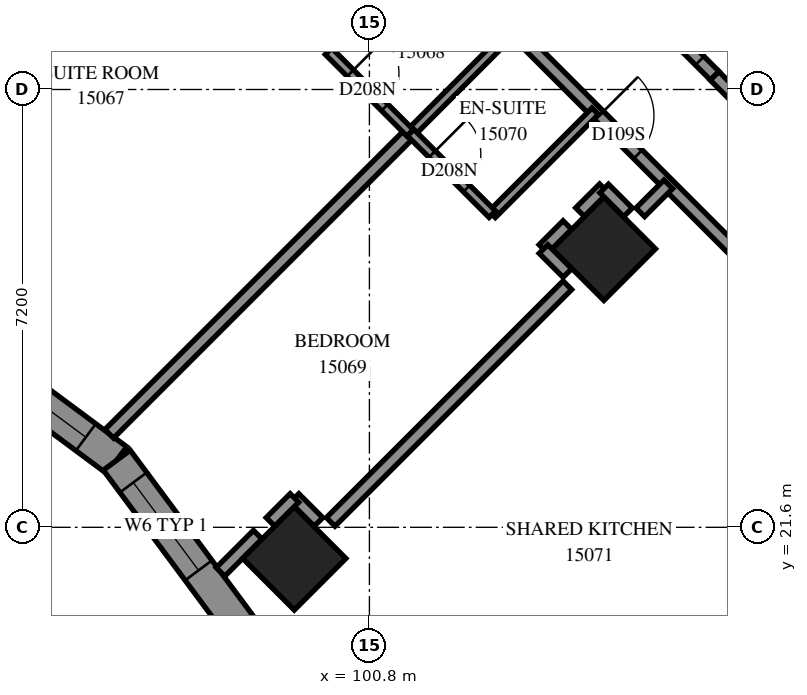
"""IFC4 building model, lengths in metres.
Left out: names, types, materials, properties, quantities, classifications, styles, units other than length and angle.
Written with IfcOpenShell. Run it as: python <this file> out.ifc"""

import sys

from ifc_helpers import new_model, si_unit, direction, frame, frame_2d, origin, origin_2d, place, context, subcontext, project, spatial, polyline, rectangle, outline, extrude, element, fill, save


model = new_model("IFC4")
c1 = context("Model", 3, precision=1e-05, world=origin(), true_north=direction((0.0, 1.0)))
c2 = subcontext(c1, "Body", "Model", "MODEL_VIEW")
j1 = project(units=[si_unit("LENGTHUNIT", "METRE"), si_unit("PLANEANGLEUNIT", "RADIAN")], contexts=[c1])
p1 = place(None, origin())
s1 = spatial("IfcSite", under=j1, at=p1, CompositionType="ELEMENT")
p2 = place(p1, origin())
s2 = spatial("IfcBuilding", under=s1, at=p2, CompositionType="ELEMENT")
p3 = place(p2, frame((0.0, 0.0, 57.6)))
s3 = spatial("IfcBuildingStorey", under=s2, at=p3, CompositionType="ELEMENT", Elevation=57.6)
for number, where, z_axis, x_axis in (
    (1, (104.656, 26.18, 0.0), (0.0, 0.0, 1.0), (0.707, -0.707, 0.0)),
    (2, (99.565, 21.088, 0.0), (0.0, 0.0, 1.0), (0.707, -0.707, 0.0)),
):
    element("IfcColumn", number, at=place(p3, frame(where, z_axis=z_axis, x_axis=x_axis)), inside=s3, PredefinedType="COLUMN", context=c2, shape_type="SweptSolid", body=[
        extrude(rectangle(XDim=1.2, YDim=1.2, at=origin_2d()), origin(), (0.0, 0.0, 1.0), 3.1),
    ])
p4 = place(p3, frame((93.505, 25.035, 0.0), z_axis=(0.0, 0.0, 1.0), x_axis=(0.8029298561, -0.5960735241, 0.0)))
e3 = element("IfcWall", 3, at=p4, inside=s3, PredefinedType="SOLIDWALL", context=c2, shape_type="SweptSolid", body=[
    extrude(outline(polyline([(-0.041, -0.275), (3.87, -0.275), (3.951, 0.275), (0.041, 0.275), (-0.041, -0.275)])), origin(), (0.0, 0.0, 1.0), 3.1),
])
p5 = place(p4, frame((0.477, 0.0, 0.5)))
e4 = element("IfcOpeningElement", 4, at=p5, cuts=e3, PredefinedType="OPENING", context=c2, shape_type="SweptSolid", body=[
    extrude(rectangle(XDim=2.8, YDim=2.45, at=frame_2d((1.4, 1.225))), frame((0.0, 0.285, 0.0), z_axis=(0.0, -1.0, 0.0), x_axis=(1.0, 0.0, 0.0)), (0.0, 0.0, 1.0), 0.57),
])
p6 = place(p3, frame((96.645, 22.704, 0.0), z_axis=(0.0, 0.0, 1.0), x_axis=(0.5960735241, -0.8029298561, 0.0)))
e5 = element("IfcWall", 5, at=p6, inside=s3, PredefinedType="SOLIDWALL", context=c2, shape_type="SweptSolid", body=[
    extrude(outline(polyline([(0.041, -0.275), (3.951, -0.275), (3.87, 0.275), (-0.041, 0.275), (0.041, -0.275)])), origin(), (0.0, 0.0, 1.0), 3.1),
])
p7 = place(p6, frame((0.456, 0.0, 0.7)))
e6 = element("IfcOpeningElement", 6, at=p7, cuts=e5, PredefinedType="OPENING", context=c2, shape_type="SweptSolid", body=[
    extrude(rectangle(XDim=1.8, YDim=2.2, at=frame_2d((0.9, 1.1))), frame((0.0, 0.285, 0.0), z_axis=(0.0, -1.0, 0.0), x_axis=(1.0, 0.0, 0.0)), (0.0, 0.0, 1.0), 0.57),
])
p8 = place(p3, frame((101.825, 31.125, 0.0), z_axis=(0.0, 0.0, 1.0), x_axis=(0.7071067812, -0.7071067812, 0.0)))
e7 = element("IfcWall", 7, at=p8, inside=s3, PredefinedType="PARTITIONING", context=c2, shape_type="SweptSolid", body=[
    extrude(rectangle(XDim=12.7, YDim=0.2, at=frame_2d((6.35, 0.0))), origin(), (0.0, 0.0, 1.0), 3.1),
])
p9 = place(p8, frame((3.895, 0.0, 0.0)))
e8 = element("IfcOpeningElement", 8, at=p9, cuts=e7, PredefinedType="OPENING", context=c2, shape_type="SweptSolid", body=[
    extrude(rectangle(XDim=0.9, YDim=2.1, at=frame_2d((0.45, 1.05))), frame((0.0, 0.11, 0.0), z_axis=(0.0, -1.0, 0.0), x_axis=(1.0, 0.0, 0.0)), (0.0, 0.0, 1.0), 0.22),
])
p10 = place(p8, frame((9.056, 0.0, 0.0)))
e9 = element("IfcOpeningElement", 9, at=p10, cuts=e7, PredefinedType="OPENING", context=c2, shape_type="SweptSolid", body=[
    extrude(rectangle(XDim=1.0, YDim=2.1, at=frame_2d((0.5, 1.05))), frame((0.0, 0.11, 0.0), z_axis=(0.0, -1.0, 0.0), x_axis=(1.0, 0.0, 0.0)), (0.0, 0.0, 1.0), 0.22),
])
p11 = place(p3, frame((96.522, 23.138, 0.0), z_axis=(0.0, 0.0, 1.0), x_axis=(0.707113922, 0.7070996403, 0.0)))
e10 = element("IfcWall", 10, at=p11, inside=s3, PredefinedType="PARTITIONING", context=c2, shape_type="SweptSolid", body=[
    extrude(rectangle(XDim=7.002, YDim=0.2, at=frame_2d((3.501, 0.0))), origin(), (0.0, 0.0, 1.0), 3.1),
])
p12 = place(p3, frame((91.457, 28.256, 0.0), z_axis=(0.0, 0.0, 1.0), x_axis=(0.7071067812, 0.7071067812, 0.0)))
e11 = element("IfcWall", 11, at=p12, inside=s3, PredefinedType="PARTITIONING", context=c2, shape_type="SweptSolid", body=[
    extrude(rectangle(XDim=6.965, YDim=0.2, at=frame_2d((3.482, 0.0))), origin(), (0.0, 0.0, 1.0), 3.1),
])
p13 = place(p3, frame((100.163, 21.689, 0.0), z_axis=(0.0, 0.0, 1.0), x_axis=(0.7071067812, 0.7071067812, 0.0)))
e12 = element("IfcWall", 12, at=p13, inside=s3, PredefinedType="PARTITIONING", context=c2, shape_type="SweptSolid", body=[
    extrude(rectangle(XDim=5.504, YDim=0.2, at=frame_2d((2.752, 0.0))), origin(), (0.0, 0.0, 1.0), 3.1),
])
p14 = place(p3, frame((105.257, 16.597, 0.0), z_axis=(0.0, 0.0, 1.0), x_axis=(0.7072884866, 0.706925029, 0.0)))
e13 = element("IfcWall", 13, at=p14, inside=s3, PredefinedType="PARTITIONING", context=c2, shape_type="SweptSolid", body=[
    extrude(rectangle(XDim=5.503, YDim=0.2, at=frame_2d((2.751, 0.0))), origin(), (0.0, 0.0, 1.0), 2.6),
])
p15 = place(p3, frame((104.445, 31.059, 0.0), z_axis=(0.0, 0.0, 1.0), x_axis=(0.7074545101, -0.7067588812, 0.0)))
e14 = element("IfcWall", 14, at=p15, inside=s3, PredefinedType="PARTITIONING", context=c2, shape_type="SweptSolid", body=[
    extrude(rectangle(XDim=2.875, YDim=0.2, at=frame_2d((1.438, 0.0))), origin(), (0.0, 0.0, 1.0), 3.1),
])
p16 = place(p15, frame((1.626, 0.0, 0.0)))
e15 = element("IfcOpeningElement", 15, at=p16, cuts=e14, PredefinedType="OPENING", context=c2, shape_type="SweptSolid", body=[
    extrude(rectangle(XDim=0.9, YDim=2.1, at=frame_2d((0.45, 1.05))), frame((0.0, 0.11, 0.0), z_axis=(0.0, -1.0, 0.0), x_axis=(1.0, 0.0, 0.0)), (0.0, 0.0, 1.0), 0.22),
])
p17 = place(p3, frame((100.129, 29.433, 0.0), z_axis=(0.0, 0.0, 1.0), x_axis=(0.7071067812, 0.7071067812, 0.0)))
e16 = element("IfcWall", 16, at=p17, inside=s3, PredefinedType="PARTITIONING", context=c2, shape_type="SweptSolid", body=[
    extrude(rectangle(XDim=2.401, YDim=0.15, at=frame_2d((1.201, 0.0))), origin(), (0.0, 0.0, 1.0), 3.1),
])
p18 = place(p3, frame((101.477, 28.085, 0.0), z_axis=(0.0, 0.0, 1.0), x_axis=(0.706689978, 0.7075233388, 0.0)))
e17 = element("IfcWall", 17, at=p18, inside=s3, PredefinedType="PARTITIONING", context=c2, shape_type="SweptSolid", body=[
    extrude(rectangle(XDim=2.4, YDim=0.15, at=frame_2d((1.2, 0.0))), origin(), (0.0, 0.0, 1.0), 3.1),
])
p19 = place(p3, frame((102.817, 26.747, 0.0), z_axis=(0.0, 0.0, 1.0), x_axis=(0.7071067812, 0.7071067812, 0.0)))
e18 = element("IfcWall", 18, at=p19, inside=s3, PredefinedType="PARTITIONING", context=c2, shape_type="SweptSolid", body=[
    extrude(rectangle(XDim=2.398, YDim=0.15, at=frame_2d((1.199, 0.0))), origin(), (0.0, 0.0, 1.0), 3.1),
])
p20 = place(p3, frame((100.127, 29.429, 0.0), z_axis=(0.0, 0.0, 1.0), x_axis=(0.7071067812, -0.7071067812, 0.0)))
e19 = element("IfcWall", 19, at=p20, inside=s3, PredefinedType="PARTITIONING", context=c2, shape_type="SweptSolid", body=[
    extrude(rectangle(XDim=1.901, YDim=0.15, at=frame_2d((0.95, 0.0))), origin(), (0.0, 0.0, 1.0), 3.1),
])
p21 = place(p20, frame((0.508, 0.0, 0.0)))
e20 = element("IfcOpeningElement", 20, at=p21, cuts=e19, PredefinedType="OPENING", context=c2, shape_type="SweptSolid", body=[
    extrude(rectangle(XDim=0.8, YDim=2.1, at=frame_2d((0.4, 1.05))), frame((0.0, 0.085, 0.0), z_axis=(0.0, -1.0, 0.0), x_axis=(1.0, 0.0, 0.0)), (0.0, 0.0, 1.0), 0.17),
])
p22 = place(p3, frame((101.477, 28.091, 0.0), z_axis=(0.0, 0.0, 1.0), x_axis=(0.7076330979, -0.7065800724, 0.0)))
e21 = element("IfcWall", 21, at=p22, inside=s3, PredefinedType="PARTITIONING", context=c2, shape_type="SweptSolid", body=[
    extrude(rectangle(XDim=1.899, YDim=0.15, at=frame_2d((0.95, 0.0))), origin(), (0.0, 0.0, 1.0), 3.1),
])
p23 = place(p22, frame((0.501, 0.0, 0.0)))
e22 = element("IfcOpeningElement", 22, at=p23, cuts=e21, PredefinedType="OPENING", context=c2, shape_type="SweptSolid", body=[
    extrude(rectangle(XDim=0.8, YDim=2.1, at=frame_2d((0.4, 1.05))), frame((0.0, 0.085, 0.0), z_axis=(0.0, -1.0, 0.0), x_axis=(1.0, 0.0, 0.0)), (0.0, 0.0, 1.0), 0.17),
])
p24 = place(p3, frame((98.352, 20.867, 0.0), z_axis=(0.0, 0.0, 1.0), x_axis=(0.7071645631, 0.7070489945, 0.0)))
e23 = element("IfcWall", 23, at=p24, inside=s3, PredefinedType="PARTITIONING", context=c2, shape_type="SweptSolid", body=[
    extrude(rectangle(XDim=0.865, YDim=0.2, at=frame_2d((0.433, 0.0))), origin(), (0.0, 0.0, 1.0), 3.1),
])
p25 = place(p3, frame((106.476, 29.024, 0.0), z_axis=(0.0, 0.0, 1.0), x_axis=(0.7057270646, -0.7084838109, 0.0)))
e24 = element("IfcWall", 24, at=p25, inside=s3, PredefinedType="PARTITIONING", context=c2, shape_type="SweptSolid", body=[
    extrude(rectangle(XDim=0.726, YDim=0.2, at=frame_2d((0.363, 0.0))), origin(), (0.0, 0.0, 1.0), 3.1),
])
p26 = place(p3, frame((105.255, 26.781, 0.0), z_axis=(0.0, 0.0, 1.0), x_axis=(0.7071067812, 0.7071067812, 0.0)))
e25 = element("IfcWall", 25, at=p26, inside=s3, PredefinedType="PARTITIONING", context=c2, shape_type="SweptSolid", body=[
    extrude(rectangle(XDim=0.65, YDim=0.2, at=frame_2d((0.325, 0.0))), origin(), (0.0, 0.0, 1.0), 3.1),
])
for number, where, z_axis, x_axis in (
    (26, (99.568, 22.082, 0.0), (0.0, 0.0, 1.0), (0.707, -0.707, 0.0)),
    (27, (99.173, 21.689, 0.0), (0.0, 0.0, 1.0), (0.707, 0.707, 0.0)),
    (28, (103.661, 26.177, 0.0), (0.0, 0.0, 1.0), (0.707, 0.707, 0.0)),
    (29, (103.662, 26.177, 0.0), (0.0, 0.0, 1.0), (0.707, -0.707, 0.0)),
):
    element("IfcWall", number, at=place(p3, frame(where, z_axis=z_axis, x_axis=x_axis)), inside=s3, PredefinedType="PARTITIONING", context=c2, shape_type="SweptSolid", body=[
        extrude(rectangle(XDim=0.557, YDim=0.2, at=frame_2d((0.279, 0.0))), origin(), (0.0, 0.0, 1.0), 3.1),
    ])
p27 = place(p3, frame((104.263, 26.784, 0.0), z_axis=(0.0, 0.0, 1.0), x_axis=(0.7089037401, 0.705305244, 0.0)))
e30 = element("IfcWall", 30, at=p27, inside=s3, PredefinedType="PARTITIONING", context=c2, shape_type="SweptSolid", body=[
    extrude(rectangle(XDim=0.556, YDim=0.2, at=frame_2d((0.278, 0.0))), origin(), (0.0, 0.0, 1.0), 3.1),
])
p28 = place(p3, frame((104.66, 27.172, 0.0), z_axis=(0.0, 0.0, 1.0), x_axis=(0.7071067812, -0.7071067812, 0.0)))
e31 = element("IfcWall", 31, at=p28, inside=s3, PredefinedType="PARTITIONING", context=c2, shape_type="SweptSolid", body=[
    extrude(rectangle(XDim=0.554, YDim=0.2, at=frame_2d((0.277, 0.0))), origin(), (0.0, 0.0, 1.0), 3.1),
])
p29 = place(p5, origin())
e32 = element("IfcWindow", 32, at=p29, inside=s3, PartitioningType="SINGLE_PANEL", PredefinedType="WINDOW", context=c2, shape_type="SweptSolid", body=[
    extrude(rectangle(XDim=2.8, YDim=2.45, at=frame_2d((1.4, 1.225))), frame((0.0, 0.155, 0.0), z_axis=(0.0, -1.0, 0.0), x_axis=(1.0, 0.0, 0.0)), (0.0, 0.0, 1.0), 0.06),
])
fill(e4, e32)
p30 = place(p16, origin())
e33 = element("IfcDoor", 33, at=p30, inside=s3, OperationType="SINGLE_SWING_RIGHT", PredefinedType="DOOR", context=c2, shape_type="SweptSolid", body=[
    extrude(rectangle(XDim=0.9, YDim=2.1, at=frame_2d((0.45, 1.05))), frame((0.0, 0.025, 0.0), z_axis=(0.0, -1.0, 0.0), x_axis=(1.0, 0.0, 0.0)), (0.0, 0.0, 1.0), 0.05),
])
fill(e15, e33)
p31 = place(p21, origin())
e34 = element("IfcDoor", 34, at=p31, inside=s3, OperationType="SINGLE_SWING_RIGHT", PredefinedType="DOOR", context=c2, shape_type="SweptSolid", body=[
    extrude(rectangle(XDim=0.8, YDim=2.1, at=frame_2d((0.4, 1.05))), frame((0.0, 0.025, 0.0), z_axis=(0.0, -1.0, 0.0), x_axis=(1.0, 0.0, 0.0)), (0.0, 0.0, 1.0), 0.05),
])
fill(e20, e34)
p32 = place(p9, origin())
e35 = element("IfcDoor", 35, at=p32, inside=s3, OperationType="SINGLE_SWING_LEFT", PredefinedType="DOOR", context=c2, shape_type="SweptSolid", body=[
    extrude(rectangle(XDim=0.9, YDim=2.1, at=frame_2d((0.45, 1.05))), frame((0.0, 0.025, 0.0), z_axis=(0.0, -1.0, 0.0), x_axis=(1.0, 0.0, 0.0)), (0.0, 0.0, 1.0), 0.05),
])
fill(e8, e35)
p33 = place(p23, origin())
e36 = element("IfcDoor", 36, at=p33, inside=s3, OperationType="SINGLE_SWING_RIGHT", PredefinedType="DOOR", context=c2, shape_type="SweptSolid", body=[
    extrude(rectangle(XDim=0.8, YDim=2.1, at=frame_2d((0.4, 1.05))), frame((0.0, 0.025, 0.0), z_axis=(0.0, -1.0, 0.0), x_axis=(1.0, 0.0, 0.0)), (0.0, 0.0, 1.0), 0.05),
])
fill(e22, e36)
p34 = place(p7, origin())
e37 = element("IfcWindow", 37, at=p34, inside=s3, PartitioningType="SINGLE_PANEL", PredefinedType="WINDOW", context=c2, shape_type="SweptSolid", body=[
    extrude(rectangle(XDim=1.8, YDim=2.2, at=frame_2d((0.9, 1.1))), frame((0.0, 0.155, 0.0), z_axis=(0.0, -1.0, 0.0), x_axis=(1.0, 0.0, 0.0)), (0.0, 0.0, 1.0), 0.06),
])
fill(e6, e37)
save(model, sys.argv[1])
